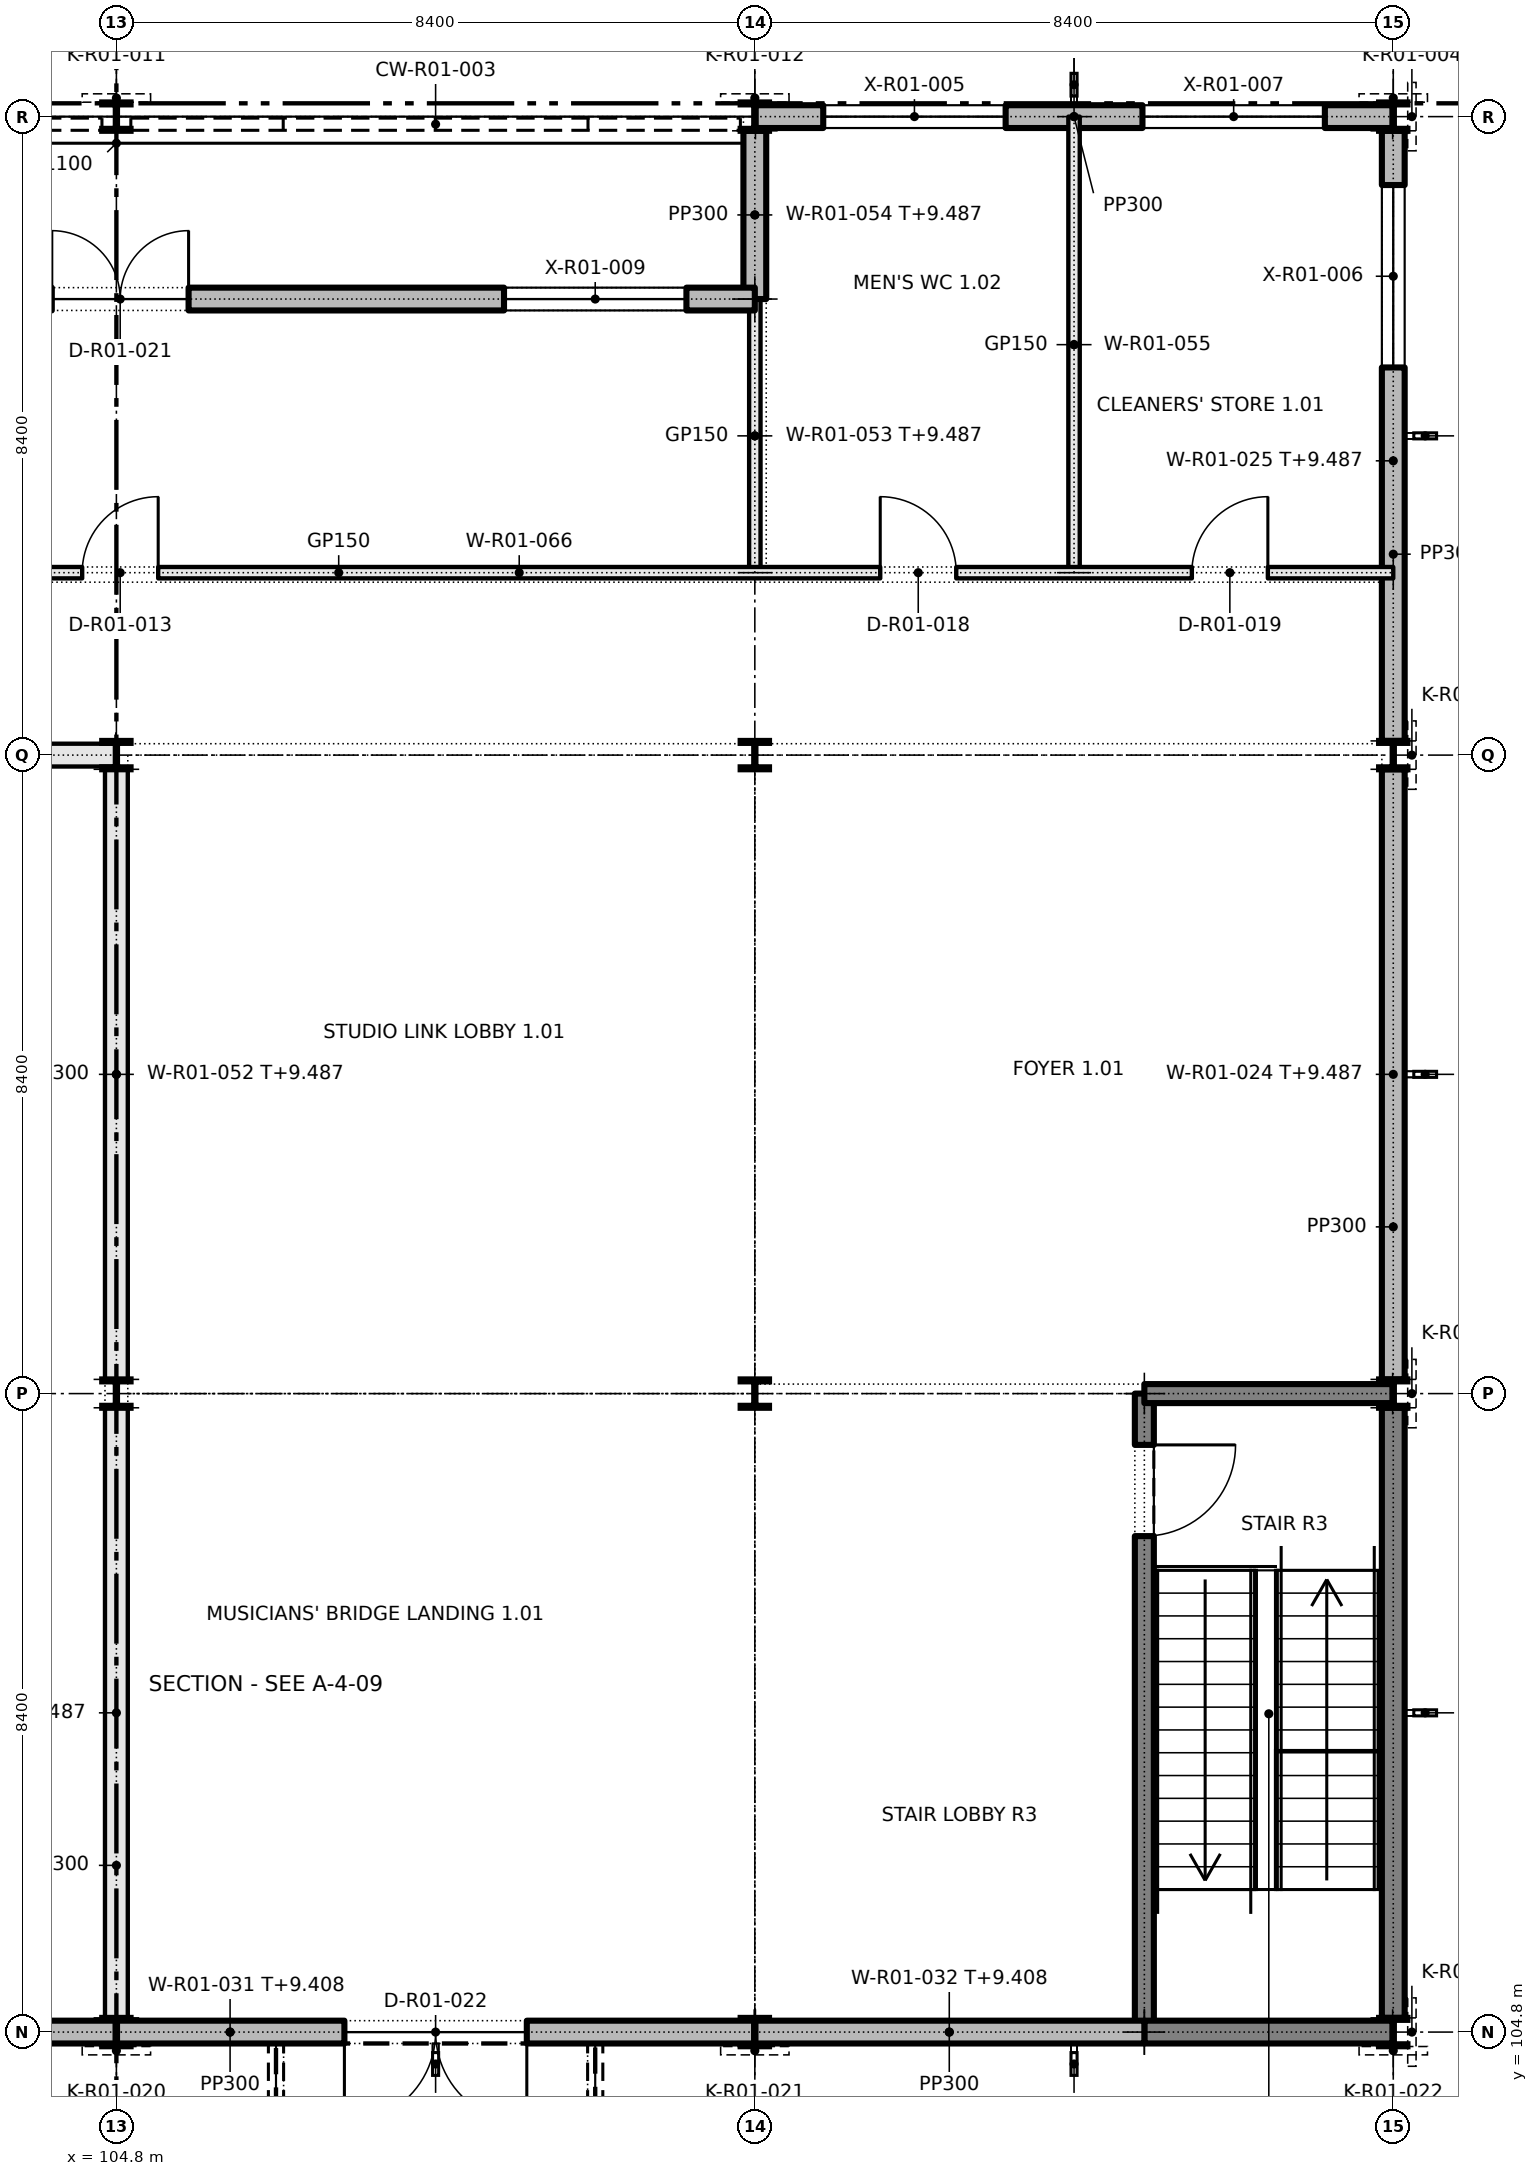
"""IFC4 building model, lengths in metres.
Left out: names, types, materials, properties, quantities, classifications, styles, units other than length and angle.
Written with IfcOpenShell. Run it as: python <this file> out.ifc"""

import sys

from ifc_helpers import new_model, si_unit, direction, frame, frame_2d, origin, origin_2d, place, context, subcontext, project, spatial, rectangle, i_section, extrude, element, fill, save


model = new_model("IFC4")
c1 = context("Model", 3, precision=1e-05, world=origin(), true_north=direction((0.0, 1.0)))
c2 = subcontext(c1, "Body", "Model", "MODEL_VIEW")
j1 = project(units=[si_unit("LENGTHUNIT", "METRE"), si_unit("PLANEANGLEUNIT", "RADIAN")], contexts=[c1])
p1 = place(None, origin())
s1 = spatial("IfcSite", under=j1, at=p1, CompositionType="ELEMENT")
p2 = place(p1, origin())
s2 = spatial("IfcBuilding", under=s1, at=p2, CompositionType="ELEMENT")
p3 = place(p2, frame((0.0, 0.0, 5.4)))
s3 = spatial("IfcBuildingStorey", under=s2, at=p3, CompositionType="ELEMENT", Elevation=5.4)
for number, where, z_axis, x_axis in (
    (1, (104.8, 104.8, 0.0), (0.0, 0.0, 1.0), (1.0, 0.0, 0.0)),
    (2, (104.8, 113.2, 0.0), (0.0, 0.0, 1.0), (1.0, 0.0, 0.0)),
    (3, (104.8, 121.6, 0.0), (0.0, 0.0, 1.0), (1.0, 0.0, 0.0)),
    (4, (104.8, 130.0, 0.0), (0.0, 0.0, 1.0), (1.0, 0.0, 0.0)),
    (5, (113.2, 104.8, 0.0), (0.0, 0.0, 1.0), (1.0, 0.0, 0.0)),
    (6, (113.2, 113.2, 0.0), (0.0, 0.0, 1.0), (1.0, 0.0, 0.0)),
    (7, (113.2, 121.6, 0.0), (0.0, 0.0, 1.0), (1.0, 0.0, 0.0)),
    (8, (113.2, 130.0, 0.0), (0.0, 0.0, 1.0), (1.0, 0.0, 0.0)),
    (9, (121.6, 104.8, 0.0), (0.0, 0.0, 1.0), (1.0, 0.0, 0.0)),
    (10, (121.6, 113.2, 0.0), (0.0, 0.0, 1.0), (1.0, 0.0, 0.0)),
    (11, (121.6, 121.6, 0.0), (0.0, 0.0, 1.0), (1.0, 0.0, 0.0)),
    (12, (121.6, 130.0, 0.0), (0.0, 0.0, 1.0), (1.0, 0.0, 0.0)),
):
    element("IfcColumn", number, at=place(p3, frame(where, z_axis=z_axis, x_axis=x_axis)), inside=s3, PredefinedType="COLUMN", context=c2, shape_type="SweptSolid", body=[
        extrude(i_section(OverallWidth=0.373, OverallDepth=0.373, WebThickness=0.016, FlangeThickness=0.026, FilletRadius=0.015, at=origin_2d()), origin(), (0.0, 0.0, 1.0), 4.8),
    ])
p4 = place(p3, frame((118.325, 104.8, 0.0), z_axis=(0.0, 0.0, 1.0), x_axis=(0.0, 1.0, 0.0)))
e13 = element("IfcWall", 13, at=p4, inside=s3, PredefinedType="SHEAR", context=c2, shape_type="SweptSolid", body=[
    extrude(rectangle(XDim=8.4, YDim=0.25, at=frame_2d((4.2, 0.0))), origin(), (0.0, 0.0, 1.0), 4.8),
])
p5 = place(p4, frame((6.525, 0.0, 0.0)))
e14 = element("IfcOpeningElement", 14, at=p5, cuts=e13, PredefinedType="OPENING", context=c2, shape_type="SweptSolid", body=[
    extrude(rectangle(XDim=1.2, YDim=2.1, at=frame_2d((0.6, 1.05))), frame((0.0, 0.135, 0.0), z_axis=(0.0, -1.0, 0.0), x_axis=(1.0, 0.0, 0.0)), (0.0, 0.0, 1.0), 0.27),
])
p6 = place(p3, frame((121.6, 104.987, 0.0), z_axis=(0.0, 0.0, 1.0), x_axis=(0.0, 1.0, 0.0)))
e15 = element("IfcWall", 15, at=p6, inside=s3, PredefinedType="SHEAR", context=c2, shape_type="SweptSolid", body=[
    extrude(rectangle(XDim=8.027, YDim=0.3, at=frame_2d((4.013, 0.0))), origin(), (0.0, 0.0, 1.0), 4.8),
])
p7 = place(p3, frame((118.325, 104.8, 0.0), z_axis=(0.0, 0.0, 1.0), x_axis=(1.0, 0.0, 0.0)))
e16 = element("IfcWall", 16, at=p7, inside=s3, PredefinedType="SHEAR", context=c2, shape_type="SweptSolid", body=[
    extrude(rectangle(XDim=3.267, YDim=0.3, at=frame_2d((1.633, 0.0))), origin(), (0.0, 0.0, 1.0), 4.8),
])
p8 = place(p3, frame((118.325, 113.2, 0.0), z_axis=(0.0, 0.0, 1.0), x_axis=(1.0, 0.0, 0.0)))
e17 = element("IfcWall", 17, at=p8, inside=s3, PredefinedType="SHEAR", context=c2, shape_type="SweptSolid", body=[
    extrude(rectangle(XDim=3.267, YDim=0.25, at=frame_2d((1.633, 0.0))), origin(), (0.0, 0.0, 1.0), 4.8),
])
p9 = place(p3, frame((121.6, 113.387, 0.0), z_axis=(0.0, 0.0, 1.0), x_axis=(0.0, 1.0, 0.0)))
e18 = element("IfcWall", 18, at=p9, inside=s3, PredefinedType="SOLIDWALL", context=c2, shape_type="SweptSolid", body=[
    extrude(rectangle(XDim=8.027, YDim=0.3, at=frame_2d((4.013, 0.0))), origin(), (0.0, 0.0, 1.0), 4.087),
])
p10 = place(p3, frame((121.6, 121.787, 0.0), z_axis=(0.0, 0.0, 1.0), x_axis=(0.0, 1.0, 0.0)))
e19 = element("IfcWall", 19, at=p10, inside=s3, PredefinedType="SOLIDWALL", context=c2, shape_type="SweptSolid", body=[
    extrude(rectangle(XDim=8.027, YDim=0.3, at=frame_2d((4.013, 0.0))), origin(), (0.0, 0.0, 1.0), 4.087),
])
p11 = place(p10, frame((4.913, 0.0, 0.95)))
e20 = element("IfcOpeningElement", 20, at=p11, cuts=e19, PredefinedType="OPENING", context=c2, shape_type="SweptSolid", body=[
    extrude(rectangle(XDim=2.4, YDim=1.8, at=frame_2d((1.2, 0.9))), frame((0.0, 0.16, 0.0), z_axis=(0.0, -1.0, 0.0), x_axis=(1.0, 0.0, 0.0)), (0.0, 0.0, 1.0), 0.32),
])
p12 = place(p3, frame((96.392, 104.8, 0.0), z_axis=(0.0, 0.0, 1.0), x_axis=(1.0, 0.0, 0.0)))
e21 = element("IfcWall", 21, at=p12, inside=s3, PredefinedType="SOLIDWALL", context=c2, shape_type="SweptSolid", body=[
    extrude(rectangle(XDim=8.416, YDim=0.3, at=frame_2d((4.208, 0.0))), origin(), (0.0, 0.0, 1.0), 4.008),
])
p13 = place(p3, frame((104.792, 104.8, 0.0), z_axis=(0.0, 0.0, 1.0), x_axis=(1.0, 0.0, 0.0)))
e22 = element("IfcWall", 22, at=p13, inside=s3, PredefinedType="SOLIDWALL", context=c2, shape_type="SweptSolid", body=[
    extrude(rectangle(XDim=8.417, YDim=0.3, at=frame_2d((4.208, 0.0))), origin(), (0.0, 0.0, 1.0), 4.008),
])
p14 = place(p13, frame((3.008, 0.0, 0.0)))
e23 = element("IfcOpeningElement", 23, at=p14, cuts=e22, PredefinedType="OPENING", context=c2, shape_type="SweptSolid", body=[
    extrude(rectangle(XDim=2.4, YDim=2.4, at=frame_2d((1.2, 1.2))), frame((0.0, 0.16, 0.0), z_axis=(0.0, -1.0, 0.0), x_axis=(1.0, 0.0, 0.0)), (0.0, 0.0, 1.0), 0.32),
])
p15 = place(p3, frame((113.192, 104.8, 0.0), z_axis=(0.0, 0.0, 1.0), x_axis=(1.0, 0.0, 0.0)))
e24 = element("IfcWall", 24, at=p15, inside=s3, PredefinedType="SOLIDWALL", context=c2, shape_type="SweptSolid", body=[
    extrude(rectangle(XDim=5.133, YDim=0.3, at=frame_2d((2.566, 0.0))), origin(), (0.0, 0.0, 1.0), 4.008),
])
p16 = place(p3, frame((113.208, 130.0, 0.0), z_axis=(0.0, 0.0, 1.0), x_axis=(1.0, 0.0, 0.0)))
e25 = element("IfcWall", 25, at=p16, inside=s3, PredefinedType="SOLIDWALL", context=c2, shape_type="SweptSolid", body=[
    extrude(rectangle(XDim=8.384, YDim=0.3, at=frame_2d((4.192, 0.0))), origin(), (0.0, 0.0, 1.0), 4.008),
])
p17 = place(p16, frame((0.892, 0.0, 0.95)))
e26 = element("IfcOpeningElement", 26, at=p17, cuts=e25, PredefinedType="OPENING", context=c2, shape_type="SweptSolid", body=[
    extrude(rectangle(XDim=2.4, YDim=1.8, at=frame_2d((1.2, 0.9))), frame((0.0, 0.16, 0.0), z_axis=(0.0, -1.0, 0.0), x_axis=(1.0, 0.0, 0.0)), (0.0, 0.0, 1.0), 0.32),
])
p18 = place(p16, frame((5.092, 0.0, 0.95)))
e27 = element("IfcOpeningElement", 27, at=p18, cuts=e25, PredefinedType="OPENING", context=c2, shape_type="SweptSolid", body=[
    extrude(rectangle(XDim=2.4, YDim=1.8, at=frame_2d((1.2, 0.9))), frame((0.0, 0.16, 0.0), z_axis=(0.0, -1.0, 0.0), x_axis=(1.0, 0.0, 0.0)), (0.0, 0.0, 1.0), 0.32),
])
p19 = place(p3, frame((104.8, 104.987, 0.0), z_axis=(0.0, 0.0, 1.0), x_axis=(0.0, 1.0, 0.0)))
e28 = element("IfcWall", 28, at=p19, inside=s3, PredefinedType="PARTITIONING", context=c2, shape_type="SweptSolid", body=[
    extrude(rectangle(XDim=8.027, YDim=0.3, at=frame_2d((4.013, 0.0))), origin(), (0.0, 0.0, 1.0), 4.087),
])
p20 = place(p3, frame((104.8, 113.387, 0.0), z_axis=(0.0, 0.0, 1.0), x_axis=(0.0, 1.0, 0.0)))
e29 = element("IfcWall", 29, at=p20, inside=s3, PredefinedType="PARTITIONING", context=c2, shape_type="SweptSolid", body=[
    extrude(rectangle(XDim=8.027, YDim=0.3, at=frame_2d((4.013, 0.0))), origin(), (0.0, 0.0, 1.0), 4.087),
])
p21 = place(p3, frame((113.2, 124.0, 0.0), z_axis=(0.0, 0.0, 1.0), x_axis=(0.0, 1.0, 0.0)))
e30 = element("IfcWall", 30, at=p21, inside=s3, PredefinedType="PARTITIONING", context=c2, shape_type="SweptSolid", body=[
    extrude(rectangle(XDim=3.6, YDim=0.15, at=frame_2d((1.8, 0.0))), origin(), (0.0, 0.0, 1.0), 4.087),
])
p22 = place(p3, frame((113.2, 127.6, 0.0), z_axis=(0.0, 0.0, 1.0), x_axis=(0.0, 1.0, 0.0)))
e31 = element("IfcWall", 31, at=p22, inside=s3, PredefinedType="SOLIDWALL", context=c2, shape_type="SweptSolid", body=[
    extrude(rectangle(XDim=2.213, YDim=0.3, at=frame_2d((1.106, 0.0))), origin(), (0.0, 0.0, 1.0), 4.087),
])
p23 = place(p3, frame((117.4, 124.0, 0.0), z_axis=(0.0, 0.0, 1.0), x_axis=(0.0, 1.0, 0.0)))
e32 = element("IfcWall", 32, at=p23, inside=s3, PredefinedType="PARTITIONING", context=c2, shape_type="SweptSolid", body=[
    extrude(rectangle(XDim=6.0, YDim=0.15, at=frame_2d((3.0, 0.0))), origin(), (0.0, 0.0, 1.0), 4.8),
])
p24 = place(p3, frame((96.392, 121.6, 0.0), z_axis=(0.0, 0.0, 1.0), x_axis=(1.0, 0.0, 0.0)))
e33 = element("IfcWall", 33, at=p24, inside=s3, PredefinedType="PARTITIONING", context=c2, shape_type="SweptSolid", body=[
    extrude(rectangle(XDim=8.4, YDim=0.3, at=frame_2d((4.2, 0.0))), origin(), (0.0, 0.0, 1.0), 4.008),
])
p25 = place(p3, frame((96.4, 124.0, 0.0), z_axis=(0.0, 0.0, 1.0), x_axis=(1.0, 0.0, 0.0)))
e34 = element("IfcWall", 34, at=p25, inside=s3, PredefinedType="PARTITIONING", context=c2, shape_type="SweptSolid", body=[
    extrude(rectangle(XDim=25.2, YDim=0.15, at=frame_2d((12.6, 0.0))), origin(), (0.0, 0.0, 1.0), 4.8),
])
p26 = place(p25, frame((7.95, 0.0, 0.0)))
e35 = element("IfcOpeningElement", 35, at=p26, cuts=e34, PredefinedType="OPENING", context=c2, shape_type="SweptSolid", body=[
    extrude(rectangle(XDim=1.0, YDim=2.1, at=frame_2d((0.5, 1.05))), frame((0.0, 0.085, 0.0), z_axis=(0.0, -1.0, 0.0), x_axis=(1.0, 0.0, 0.0)), (0.0, 0.0, 1.0), 0.17),
])
p27 = place(p25, frame((18.45, 0.0, 0.0)))
e36 = element("IfcOpeningElement", 36, at=p27, cuts=e34, PredefinedType="OPENING", context=c2, shape_type="SweptSolid", body=[
    extrude(rectangle(XDim=1.0, YDim=2.1, at=frame_2d((0.5, 1.05))), frame((0.0, 0.085, 0.0), z_axis=(0.0, -1.0, 0.0), x_axis=(1.0, 0.0, 0.0)), (0.0, 0.0, 1.0), 0.17),
])
p28 = place(p25, frame((22.55, 0.0, 0.0)))
e37 = element("IfcOpeningElement", 37, at=p28, cuts=e34, PredefinedType="OPENING", context=c2, shape_type="SweptSolid", body=[
    extrude(rectangle(XDim=1.0, YDim=2.1, at=frame_2d((0.5, 1.05))), frame((0.0, 0.085, 0.0), z_axis=(0.0, -1.0, 0.0), x_axis=(1.0, 0.0, 0.0)), (0.0, 0.0, 1.0), 0.17),
])
p29 = place(p3, frame((96.4, 127.6, 0.0), z_axis=(0.0, 0.0, 1.0), x_axis=(1.0, 0.0, 0.0)))
e38 = element("IfcWall", 38, at=p29, inside=s3, PredefinedType="SOLIDWALL", context=c2, shape_type="SweptSolid", body=[
    extrude(rectangle(XDim=16.8, YDim=0.3, at=frame_2d((8.4, 0.0))), origin(), (0.0, 0.0, 1.0), 4.8),
])
p30 = place(p29, frame((7.55, 0.0, 0.0)))
e39 = element("IfcOpeningElement", 39, at=p30, cuts=e38, PredefinedType="OPENING", context=c2, shape_type="SweptSolid", body=[
    extrude(rectangle(XDim=1.8, YDim=2.1, at=frame_2d((0.9, 1.05))), frame((0.0, 0.16, 0.0), z_axis=(0.0, -1.0, 0.0), x_axis=(1.0, 0.0, 0.0)), (0.0, 0.0, 1.0), 0.32),
])
p31 = place(p29, frame((0.9, 0.0, 0.95)))
e40 = element("IfcOpeningElement", 40, at=p31, cuts=e38, PredefinedType="OPENING", context=c2, shape_type="SweptSolid", body=[
    extrude(rectangle(XDim=2.4, YDim=1.8, at=frame_2d((1.2, 0.9))), frame((0.0, 0.16, 0.0), z_axis=(0.0, -1.0, 0.0), x_axis=(1.0, 0.0, 0.0)), (0.0, 0.0, 1.0), 0.32),
])
p32 = place(p29, frame((13.5, 0.0, 0.95)))
e41 = element("IfcOpeningElement", 41, at=p32, cuts=e38, PredefinedType="OPENING", context=c2, shape_type="SweptSolid", body=[
    extrude(rectangle(XDim=2.4, YDim=1.8, at=frame_2d((1.2, 0.9))), frame((0.0, 0.16, 0.0), z_axis=(0.0, -1.0, 0.0), x_axis=(1.0, 0.0, 0.0)), (0.0, 0.0, 1.0), 0.32),
])
p33 = place(p17, origin())
e42 = element("IfcWindow", 42, at=p33, inside=s3, PartitioningType="DOUBLE_PANEL_VERTICAL", PredefinedType="WINDOW", context=c2, shape_type="SweptSolid", body=[
    extrude(rectangle(XDim=2.4, YDim=1.8, at=frame_2d((1.2, 0.9))), frame((0.0, 0.03, 0.0), z_axis=(0.0, -1.0, 0.0), x_axis=(1.0, 0.0, 0.0)), (0.0, 0.0, 1.0), 0.06),
])
fill(e26, e42)
p34 = place(p11, origin())
e43 = element("IfcWindow", 43, at=p34, inside=s3, PartitioningType="DOUBLE_PANEL_VERTICAL", PredefinedType="WINDOW", context=c2, shape_type="SweptSolid", body=[
    extrude(rectangle(XDim=2.4, YDim=1.8, at=frame_2d((1.2, 0.9))), frame((0.0, 0.03, 0.0), z_axis=(0.0, -1.0, 0.0), x_axis=(1.0, 0.0, 0.0)), (0.0, 0.0, 1.0), 0.06),
])
fill(e20, e43)
p35 = place(p18, origin())
e44 = element("IfcWindow", 44, at=p35, inside=s3, PartitioningType="DOUBLE_PANEL_VERTICAL", PredefinedType="WINDOW", context=c2, shape_type="SweptSolid", body=[
    extrude(rectangle(XDim=2.4, YDim=1.8, at=frame_2d((1.2, 0.9))), frame((0.0, 0.03, 0.0), z_axis=(0.0, -1.0, 0.0), x_axis=(1.0, 0.0, 0.0)), (0.0, 0.0, 1.0), 0.06),
])
fill(e27, e44)
p36 = place(p5, frame((1.2, 0.0, 0.0), z_axis=(0.0, 0.0, 1.0), x_axis=(-1.0, 0.0, 0.0)))
e45 = element("IfcDoor", 45, at=p36, inside=s3, OperationType="SINGLE_SWING_LEFT", PredefinedType="DOOR", context=c2, shape_type="SweptSolid", body=[
    extrude(rectangle(XDim=1.2, YDim=2.1, at=frame_2d((0.6, 1.05))), frame((0.0, 0.025, 0.0), z_axis=(0.0, -1.0, 0.0), x_axis=(1.0, 0.0, 0.0)), (0.0, 0.0, 1.0), 0.05),
])
fill(e14, e45)
p37 = place(p26, origin())
e46 = element("IfcDoor", 46, at=p37, inside=s3, OperationType="SINGLE_SWING_RIGHT", PredefinedType="DOOR", context=c2, shape_type="SweptSolid", body=[
    extrude(rectangle(XDim=1.0, YDim=2.1, at=frame_2d((0.5, 1.05))), frame((0.0, 0.025, 0.0), z_axis=(0.0, -1.0, 0.0), x_axis=(1.0, 0.0, 0.0)), (0.0, 0.0, 1.0), 0.05),
])
fill(e35, e46)
p38 = place(p27, origin())
e47 = element("IfcDoor", 47, at=p38, inside=s3, OperationType="SINGLE_SWING_LEFT", PredefinedType="DOOR", context=c2, shape_type="SweptSolid", body=[
    extrude(rectangle(XDim=1.0, YDim=2.1, at=frame_2d((0.5, 1.05))), frame((0.0, 0.025, 0.0), z_axis=(0.0, -1.0, 0.0), x_axis=(1.0, 0.0, 0.0)), (0.0, 0.0, 1.0), 0.05),
])
fill(e36, e47)
p39 = place(p28, origin())
e48 = element("IfcDoor", 48, at=p39, inside=s3, OperationType="SINGLE_SWING_RIGHT", PredefinedType="DOOR", context=c2, shape_type="SweptSolid", body=[
    extrude(rectangle(XDim=1.0, YDim=2.1, at=frame_2d((0.5, 1.05))), frame((0.0, 0.025, 0.0), z_axis=(0.0, -1.0, 0.0), x_axis=(1.0, 0.0, 0.0)), (0.0, 0.0, 1.0), 0.05),
])
fill(e37, e48)
p40 = place(p30, origin())
e49 = element("IfcDoor", 49, at=p40, inside=s3, OperationType="DOUBLE_DOOR_SINGLE_SWING", PredefinedType="DOOR", context=c2, shape_type="SweptSolid", body=[
    extrude(rectangle(XDim=1.8, YDim=2.1, at=frame_2d((0.9, 1.05))), frame((0.0, 0.025, 0.0), z_axis=(0.0, -1.0, 0.0), x_axis=(1.0, 0.0, 0.0)), (0.0, 0.0, 1.0), 0.05),
])
fill(e39, e49)
p41 = place(p32, origin())
e50 = element("IfcWindow", 50, at=p41, inside=s3, PartitioningType="DOUBLE_PANEL_VERTICAL", PredefinedType="WINDOW", context=c2, shape_type="SweptSolid", body=[
    extrude(rectangle(XDim=2.4, YDim=1.8, at=frame_2d((1.2, 0.9))), frame((0.0, 0.03, 0.0), z_axis=(0.0, -1.0, 0.0), x_axis=(1.0, 0.0, 0.0)), (0.0, 0.0, 1.0), 0.06),
])
fill(e41, e50)
p42 = place(p14, frame((2.4, 0.0, 0.0), z_axis=(0.0, 0.0, 1.0), x_axis=(-1.0, 0.0, 0.0)))
e51 = element("IfcDoor", 51, at=p42, inside=s3, OperationType="DOUBLE_DOOR_SINGLE_SWING", PredefinedType="DOOR", context=c2, shape_type="SweptSolid", body=[
    extrude(rectangle(XDim=2.4, YDim=2.4, at=frame_2d((1.2, 1.2))), frame((0.0, 0.025, 0.0), z_axis=(0.0, -1.0, 0.0), x_axis=(1.0, 0.0, 0.0)), (0.0, 0.0, 1.0), 0.05),
])
fill(e23, e51)
save(model, sys.argv[1])
